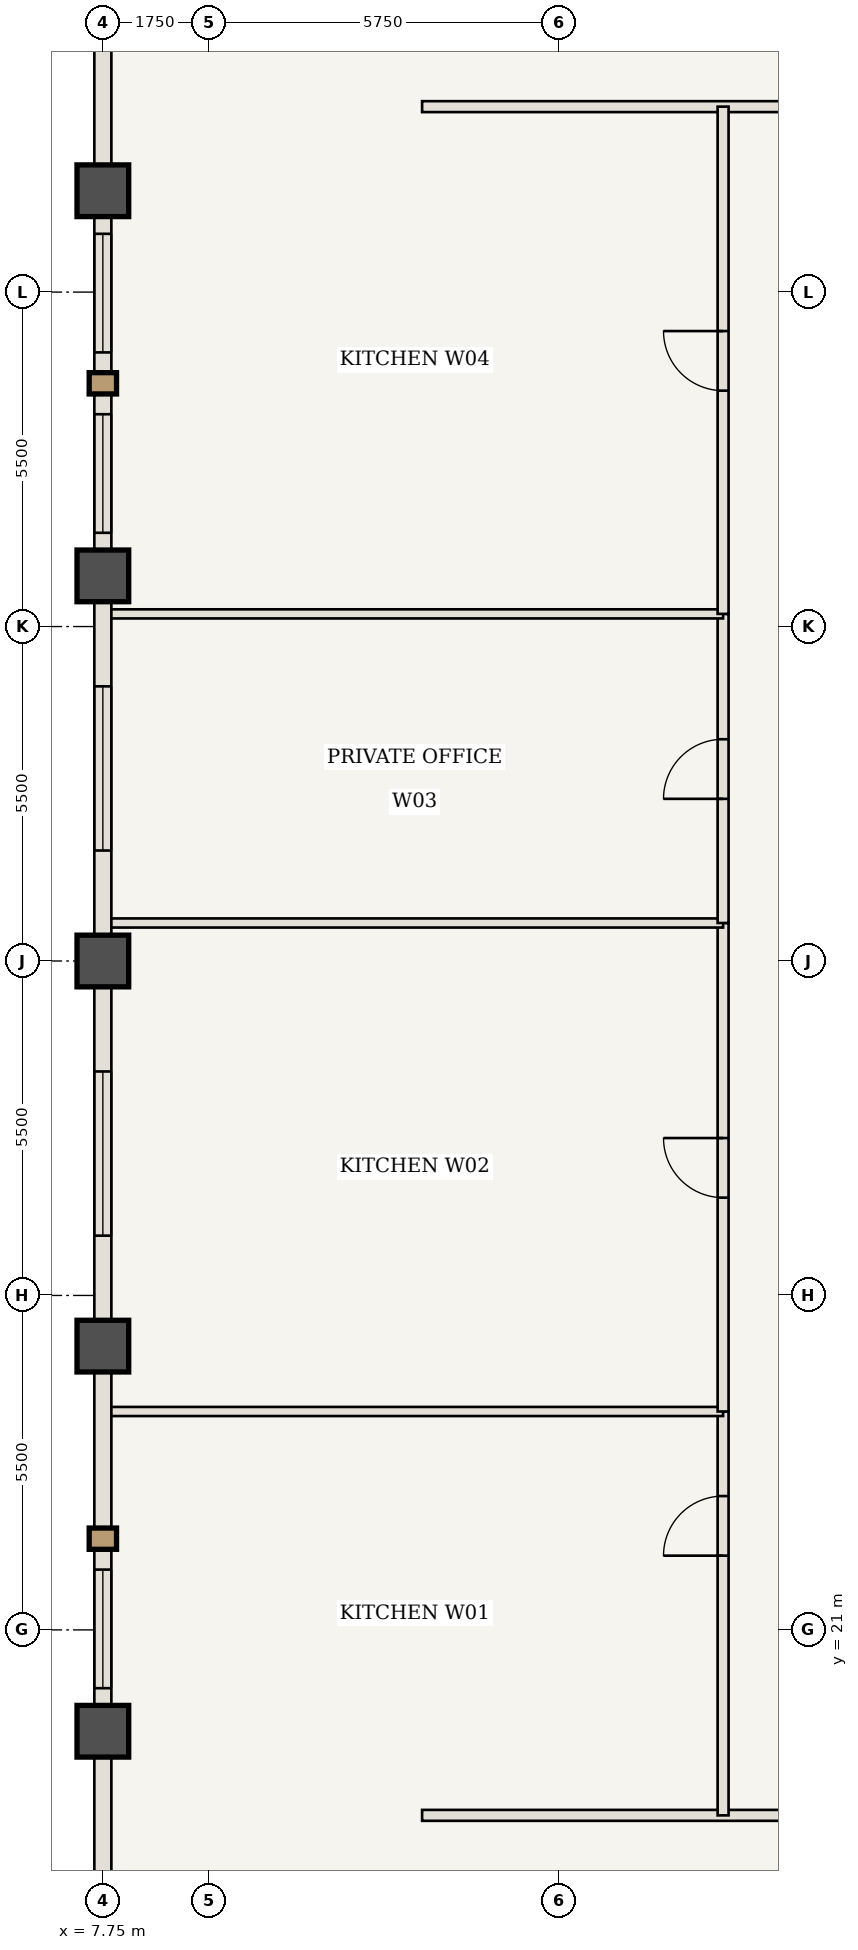
"""IFC4 building model, lengths in metres.
Left out: names, types, materials, properties, quantities, classifications, styles, units other than length and angle.
Written with IfcOpenShell. Run it as: python <this file> out.ifc"""

import sys

from ifc_helpers import new_model, si_unit, direction, frame, frame_2d, origin, origin_2d, place, context, subcontext, project, spatial, rectangle, extrude, element, fill, save


model = new_model("IFC4")
c1 = context("Model", 3, precision=1e-05, world=origin(), true_north=direction((0.0, 1.0)))
c2 = subcontext(c1, "Body", "Model", "MODEL_VIEW")
j1 = project(units=[si_unit("LENGTHUNIT", "METRE"), si_unit("PLANEANGLEUNIT", "RADIAN")], contexts=[c1])
p1 = place(None, origin())
s1 = spatial("IfcSite", under=j1, at=p1, CompositionType="ELEMENT")
p2 = place(p1, origin())
s2 = spatial("IfcBuilding", under=s1, at=p2, CompositionType="ELEMENT")
p3 = place(p2, frame((0.0, 0.0, 225.4)))
s3 = spatial("IfcBuildingStorey", under=s2, at=p3, CompositionType="ELEMENT", Elevation=225.4)
for number, where, z_axis, x_axis in (
    (1, (7.75, 19.333, 0.0), (0.0, 0.0, 1.0), (1.0, 0.0, 0.0)),
    (2, (7.75, 25.667, 0.0), (0.0, 0.0, 1.0), (1.0, 0.0, 0.0)),
    (3, (7.75, 32.0, 0.0), (0.0, 0.0, 1.0), (1.0, 0.0, 0.0)),
    (4, (7.75, 38.333, 0.0), (0.0, 0.0, 1.0), (1.0, 0.0, 0.0)),
    (5, (7.75, 44.667, 0.0), (0.0, 0.0, 1.0), (1.0, 0.0, 0.0)),
):
    element("IfcColumn", number, at=place(p3, frame(where, z_axis=z_axis, x_axis=x_axis)), inside=s3, PredefinedType="COLUMN", context=c2, shape_type="SweptSolid", body=[
        extrude(rectangle(XDim=0.85, YDim=0.85, at=origin_2d()), origin(), (0.0, 0.0, 1.0), 3.85),
    ])
p4 = place(p3, frame((13.0, 17.95, 0.0), z_axis=(0.0, 0.0, 1.0), x_axis=(1.0, 0.0, 0.0)))
e6 = element("IfcWall", 6, at=p4, inside=s3, PredefinedType="STANDARD", context=c2, shape_type="SweptSolid", body=[
    extrude(rectangle(XDim=13.292, YDim=0.18, at=frame_2d((6.646, 0.0))), origin(), (0.0, 0.0, 1.0), 3.685),
])
p5 = place(p4, frame((8.621, 0.0, 0.0)))
e7 = element("IfcOpeningElement", 7, at=p5, cuts=e6, PredefinedType="OPENING", context=c2, shape_type="SweptSolid", body=[
    extrude(rectangle(XDim=0.98, YDim=2.2, at=frame_2d((0.49, 1.1))), frame((0.0, 0.1, 0.0), z_axis=(0.0, -1.0, 0.0), x_axis=(1.0, 0.0, 0.0)), (0.0, 0.0, 1.0), 0.2),
])
p6 = place(p3, frame((13.0, 46.05, 0.0), z_axis=(0.0, 0.0, 1.0), x_axis=(1.0, 0.0, 0.0)))
e8 = element("IfcWall", 8, at=p6, inside=s3, PredefinedType="STANDARD", context=c2, shape_type="SweptSolid", body=[
    extrude(rectangle(XDim=38.0, YDim=0.18, at=frame_2d((19.0, 0.0))), origin(), (0.0, 0.0, 1.0), 3.685),
])
p7 = place(p6, frame((19.7, 0.0, 0.0)))
e9 = element("IfcOpeningElement", 9, at=p7, cuts=e8, PredefinedType="OPENING", context=c2, shape_type="SweptSolid", body=[
    extrude(rectangle(XDim=0.98, YDim=2.2, at=frame_2d((0.49, 1.1))), frame((0.0, 0.1, 0.0), z_axis=(0.0, -1.0, 0.0), x_axis=(1.0, 0.0, 0.0)), (0.0, 0.0, 1.0), 0.2),
])
p8 = place(p3, frame((17.95, 17.95, 0.0), z_axis=(0.0, 0.0, 1.0), x_axis=(0.0, 1.0, 0.0)))
e10 = element("IfcWall", 10, at=p8, inside=s3, PredefinedType="STANDARD", context=c2, shape_type="SweptSolid", body=[
    extrude(rectangle(XDim=6.642, YDim=0.18, at=frame_2d((3.321, 0.0))), origin(), (0.0, 0.0, 1.0), 3.685),
])
p9 = place(p8, frame((4.271, 0.0, 0.0)))
e11 = element("IfcOpeningElement", 11, at=p9, cuts=e10, PredefinedType="OPENING", context=c2, shape_type="SweptSolid", body=[
    extrude(rectangle(XDim=0.98, YDim=2.2, at=frame_2d((0.49, 1.1))), frame((0.0, 0.1, 0.0), z_axis=(0.0, -1.0, 0.0), x_axis=(1.0, 0.0, 0.0)), (0.0, 0.0, 1.0), 0.2),
])
p10 = place(p3, frame((7.81, 24.592, 0.0), z_axis=(0.0, 0.0, 1.0), x_axis=(1.0, 0.0, 0.0)))
e12 = element("IfcWall", 12, at=p10, inside=s3, PredefinedType="STANDARD", context=c2, shape_type="SweptSolid", body=[
    extrude(rectangle(XDim=10.14, YDim=0.15, at=frame_2d((5.07, 0.0))), origin(), (0.0, 0.0, 1.0), 3.685),
])
p11 = place(p3, frame((17.95, 24.592, 0.0), z_axis=(0.0, 0.0, 1.0), x_axis=(0.0, 1.0, 0.0)))
e13 = element("IfcWall", 13, at=p11, inside=s3, PredefinedType="STANDARD", context=c2, shape_type="SweptSolid", body=[
    extrude(rectangle(XDim=8.033, YDim=0.18, at=frame_2d((4.017, 0.0))), origin(), (0.0, 0.0, 1.0), 3.685),
])
p12 = place(p11, frame((3.517, 0.0, 0.0)))
e14 = element("IfcOpeningElement", 14, at=p12, cuts=e13, PredefinedType="OPENING", context=c2, shape_type="SweptSolid", body=[
    extrude(rectangle(XDim=0.98, YDim=2.2, at=frame_2d((0.49, 1.1))), frame((0.0, 0.1, 0.0), z_axis=(0.0, -1.0, 0.0), x_axis=(1.0, 0.0, 0.0)), (0.0, 0.0, 1.0), 0.2),
])
p13 = place(p3, frame((7.81, 32.625, 0.0), z_axis=(0.0, 0.0, 1.0), x_axis=(1.0, 0.0, 0.0)))
e15 = element("IfcWall", 15, at=p13, inside=s3, PredefinedType="STANDARD", context=c2, shape_type="SweptSolid", body=[
    extrude(rectangle(XDim=10.14, YDim=0.15, at=frame_2d((5.07, 0.0))), origin(), (0.0, 0.0, 1.0), 3.685),
])
p14 = place(p3, frame((17.95, 32.625, 0.0), z_axis=(0.0, 0.0, 1.0), x_axis=(0.0, 1.0, 0.0)))
e16 = element("IfcWall", 16, at=p14, inside=s3, PredefinedType="STANDARD", context=c2, shape_type="SweptSolid", body=[
    extrude(rectangle(XDim=5.083, YDim=0.18, at=frame_2d((2.542, 0.0))), origin(), (0.0, 0.0, 1.0), 3.685),
])
p15 = place(p14, frame((2.042, 0.0, 0.0)))
e17 = element("IfcOpeningElement", 17, at=p15, cuts=e16, PredefinedType="OPENING", context=c2, shape_type="SweptSolid", body=[
    extrude(rectangle(XDim=0.98, YDim=2.2, at=frame_2d((0.49, 1.1))), frame((0.0, 0.1, 0.0), z_axis=(0.0, -1.0, 0.0), x_axis=(1.0, 0.0, 0.0)), (0.0, 0.0, 1.0), 0.2),
])
p16 = place(p3, frame((7.81, 37.708, 0.0), z_axis=(0.0, 0.0, 1.0), x_axis=(1.0, 0.0, 0.0)))
e18 = element("IfcWall", 18, at=p16, inside=s3, PredefinedType="STANDARD", context=c2, shape_type="SweptSolid", body=[
    extrude(rectangle(XDim=10.14, YDim=0.15, at=frame_2d((5.07, 0.0))), origin(), (0.0, 0.0, 1.0), 3.685),
])
p17 = place(p3, frame((17.95, 37.708, 0.0), z_axis=(0.0, 0.0, 1.0), x_axis=(0.0, 1.0, 0.0)))
e19 = element("IfcWall", 19, at=p17, inside=s3, PredefinedType="STANDARD", context=c2, shape_type="SweptSolid", body=[
    extrude(rectangle(XDim=8.342, YDim=0.18, at=frame_2d((4.171, 0.0))), origin(), (0.0, 0.0, 1.0), 3.685),
])
p18 = place(p17, frame((3.671, 0.0, 0.0)))
e20 = element("IfcOpeningElement", 20, at=p18, cuts=e19, PredefinedType="OPENING", context=c2, shape_type="SweptSolid", body=[
    extrude(rectangle(XDim=0.98, YDim=2.2, at=frame_2d((0.49, 1.1))), frame((0.0, 0.1, 0.0), z_axis=(0.0, -1.0, 0.0), x_axis=(1.0, 0.0, 0.0)), (0.0, 0.0, 1.0), 0.2),
])
p19 = place(p3, frame((7.75, 13.0, 0.0), z_axis=(0.0, 0.0, 1.0), x_axis=(0.0, 1.0, 0.0)))
e21 = element("IfcWall", 21, at=p19, inside=s3, PredefinedType="USERDEFINED", context=c2, shape_type="SweptSolid", body=[
    extrude(rectangle(XDim=6.333, YDim=0.28, at=frame_2d((3.167, 0.0))), origin(), (0.0, 0.0, 1.0), 2.985),
])
p20 = place(p3, frame((7.75, 19.333, 0.0), z_axis=(0.0, 0.0, 1.0), x_axis=(0.0, 1.0, 0.0)))
e22 = element("IfcWall", 22, at=p20, inside=s3, PredefinedType="USERDEFINED", context=c2, shape_type="SweptSolid", body=[
    extrude(rectangle(XDim=6.333, YDim=0.28, at=frame_2d((3.167, 0.0))), origin(), (0.0, 0.0, 1.0), 2.985),
])
p21 = place(p20, frame((0.708, 0.0, 0.85)))
e23 = element("IfcOpeningElement", 23, at=p21, cuts=e22, PredefinedType="OPENING", context=c2, shape_type="SweptSolid", body=[
    extrude(rectangle(XDim=1.95, YDim=1.935, at=frame_2d((0.975, 0.968))), frame((0.0, 0.15, 0.0), z_axis=(0.0, -1.0, 0.0), x_axis=(1.0, 0.0, 0.0)), (0.0, 0.0, 1.0), 0.3),
])
p22 = place(p3, frame((7.75, 25.667, 0.0), z_axis=(0.0, 0.0, 1.0), x_axis=(0.0, 1.0, 0.0)))
e24 = element("IfcWall", 24, at=p22, inside=s3, PredefinedType="USERDEFINED", context=c2, shape_type="SweptSolid", body=[
    extrude(rectangle(XDim=6.333, YDim=0.28, at=frame_2d((3.167, 0.0))), origin(), (0.0, 0.0, 1.0), 2.985),
])
p23 = place(p22, frame((1.817, 0.0, 0.85)))
e25 = element("IfcOpeningElement", 25, at=p23, cuts=e24, PredefinedType="OPENING", context=c2, shape_type="SweptSolid", body=[
    extrude(rectangle(XDim=2.7, YDim=1.935, at=frame_2d((1.35, 0.968))), frame((0.0, 0.15, 0.0), z_axis=(0.0, -1.0, 0.0), x_axis=(1.0, 0.0, 0.0)), (0.0, 0.0, 1.0), 0.3),
])
p24 = place(p3, frame((7.75, 32.0, 0.0), z_axis=(0.0, 0.0, 1.0), x_axis=(0.0, 1.0, 0.0)))
e26 = element("IfcWall", 26, at=p24, inside=s3, PredefinedType="USERDEFINED", context=c2, shape_type="SweptSolid", body=[
    extrude(rectangle(XDim=6.333, YDim=0.28, at=frame_2d((3.167, 0.0))), origin(), (0.0, 0.0, 1.0), 2.985),
])
p25 = place(p24, frame((1.817, 0.0, 0.85)))
e27 = element("IfcOpeningElement", 27, at=p25, cuts=e26, PredefinedType="OPENING", context=c2, shape_type="SweptSolid", body=[
    extrude(rectangle(XDim=2.7, YDim=1.935, at=frame_2d((1.35, 0.968))), frame((0.0, 0.15, 0.0), z_axis=(0.0, -1.0, 0.0), x_axis=(1.0, 0.0, 0.0)), (0.0, 0.0, 1.0), 0.3),
])
p26 = place(p3, frame((7.75, 38.333, 0.0), z_axis=(0.0, 0.0, 1.0), x_axis=(0.0, 1.0, 0.0)))
e28 = element("IfcWall", 28, at=p26, inside=s3, PredefinedType="USERDEFINED", context=c2, shape_type="SweptSolid", body=[
    extrude(rectangle(XDim=6.333, YDim=0.28, at=frame_2d((3.167, 0.0))), origin(), (0.0, 0.0, 1.0), 2.985),
])
p27 = place(p26, frame((0.708, 0.0, 0.85)))
e29 = element("IfcOpeningElement", 29, at=p27, cuts=e28, PredefinedType="OPENING", context=c2, shape_type="SweptSolid", body=[
    extrude(rectangle(XDim=1.95, YDim=1.935, at=frame_2d((0.975, 0.968))), frame((0.0, 0.15, 0.0), z_axis=(0.0, -1.0, 0.0), x_axis=(1.0, 0.0, 0.0)), (0.0, 0.0, 1.0), 0.3),
])
p28 = place(p26, frame((3.675, 0.0, 0.85)))
e30 = element("IfcOpeningElement", 30, at=p28, cuts=e28, PredefinedType="OPENING", context=c2, shape_type="SweptSolid", body=[
    extrude(rectangle(XDim=1.95, YDim=1.935, at=frame_2d((0.975, 0.968))), frame((0.0, 0.15, 0.0), z_axis=(0.0, -1.0, 0.0), x_axis=(1.0, 0.0, 0.0)), (0.0, 0.0, 1.0), 0.3),
])
p29 = place(p3, frame((7.75, 44.667, 0.0), z_axis=(0.0, 0.0, 1.0), x_axis=(0.0, 1.0, 0.0)))
e31 = element("IfcWall", 31, at=p29, inside=s3, PredefinedType="USERDEFINED", context=c2, shape_type="SweptSolid", body=[
    extrude(rectangle(XDim=6.333, YDim=0.28, at=frame_2d((3.167, 0.0))), origin(), (0.0, 0.0, 1.0), 2.985),
])
p30 = place(p9, origin())
e32 = element("IfcDoor", 32, at=p30, inside=s3, OperationType="SINGLE_SWING_LEFT", PredefinedType="DOOR", context=c2, shape_type="SweptSolid", body=[
    extrude(rectangle(XDim=0.98, YDim=2.2, at=frame_2d((0.49, 1.1))), frame((0.0, 0.025, 0.0), z_axis=(0.0, -1.0, 0.0), x_axis=(1.0, 0.0, 0.0)), (0.0, 0.0, 1.0), 0.05),
])
fill(e11, e32)
p31 = place(p12, origin())
e33 = element("IfcDoor", 33, at=p31, inside=s3, OperationType="SINGLE_SWING_RIGHT", PredefinedType="DOOR", context=c2, shape_type="SweptSolid", body=[
    extrude(rectangle(XDim=0.98, YDim=2.2, at=frame_2d((0.49, 1.1))), frame((0.0, 0.025, 0.0), z_axis=(0.0, -1.0, 0.0), x_axis=(1.0, 0.0, 0.0)), (0.0, 0.0, 1.0), 0.05),
])
fill(e14, e33)
p32 = place(p15, origin())
e34 = element("IfcDoor", 34, at=p32, inside=s3, OperationType="SINGLE_SWING_LEFT", PredefinedType="DOOR", context=c2, shape_type="SweptSolid", body=[
    extrude(rectangle(XDim=0.98, YDim=2.2, at=frame_2d((0.49, 1.1))), frame((0.0, 0.025, 0.0), z_axis=(0.0, -1.0, 0.0), x_axis=(1.0, 0.0, 0.0)), (0.0, 0.0, 1.0), 0.05),
])
fill(e17, e34)
p33 = place(p18, origin())
e35 = element("IfcDoor", 35, at=p33, inside=s3, OperationType="SINGLE_SWING_RIGHT", PredefinedType="DOOR", context=c2, shape_type="SweptSolid", body=[
    extrude(rectangle(XDim=0.98, YDim=2.2, at=frame_2d((0.49, 1.1))), frame((0.0, 0.025, 0.0), z_axis=(0.0, -1.0, 0.0), x_axis=(1.0, 0.0, 0.0)), (0.0, 0.0, 1.0), 0.05),
])
fill(e20, e35)
p34 = place(p21, origin())
e36 = element("IfcWindow", 36, at=p34, inside=s3, PartitioningType="SINGLE_PANEL", PredefinedType="WINDOW", context=c2, shape_type="SweptSolid", body=[
    extrude(rectangle(XDim=1.95, YDim=1.935, at=frame_2d((0.975, 0.968))), frame((0.0, 0.03, 0.0), z_axis=(0.0, -1.0, 0.0), x_axis=(1.0, 0.0, 0.0)), (0.0, 0.0, 1.0), 0.06),
])
fill(e23, e36)
p35 = place(p23, origin())
e37 = element("IfcWindow", 37, at=p35, inside=s3, PartitioningType="SINGLE_PANEL", PredefinedType="WINDOW", context=c2, shape_type="SweptSolid", body=[
    extrude(rectangle(XDim=2.7, YDim=1.935, at=frame_2d((1.35, 0.968))), frame((0.0, 0.03, 0.0), z_axis=(0.0, -1.0, 0.0), x_axis=(1.0, 0.0, 0.0)), (0.0, 0.0, 1.0), 0.06),
])
fill(e25, e37)
p36 = place(p25, origin())
e38 = element("IfcWindow", 38, at=p36, inside=s3, PartitioningType="SINGLE_PANEL", PredefinedType="WINDOW", context=c2, shape_type="SweptSolid", body=[
    extrude(rectangle(XDim=2.7, YDim=1.935, at=frame_2d((1.35, 0.968))), frame((0.0, 0.03, 0.0), z_axis=(0.0, -1.0, 0.0), x_axis=(1.0, 0.0, 0.0)), (0.0, 0.0, 1.0), 0.06),
])
fill(e27, e38)
p37 = place(p27, origin())
e39 = element("IfcWindow", 39, at=p37, inside=s3, PartitioningType="SINGLE_PANEL", PredefinedType="WINDOW", context=c2, shape_type="SweptSolid", body=[
    extrude(rectangle(XDim=1.95, YDim=1.935, at=frame_2d((0.975, 0.968))), frame((0.0, 0.03, 0.0), z_axis=(0.0, -1.0, 0.0), x_axis=(1.0, 0.0, 0.0)), (0.0, 0.0, 1.0), 0.06),
])
fill(e29, e39)
p38 = place(p28, origin())
e40 = element("IfcWindow", 40, at=p38, inside=s3, PartitioningType="SINGLE_PANEL", PredefinedType="WINDOW", context=c2, shape_type="SweptSolid", body=[
    extrude(rectangle(XDim=1.95, YDim=1.935, at=frame_2d((0.975, 0.968))), frame((0.0, 0.03, 0.0), z_axis=(0.0, -1.0, 0.0), x_axis=(1.0, 0.0, 0.0)), (0.0, 0.0, 1.0), 0.06),
])
fill(e30, e40)
save(model, sys.argv[1])
